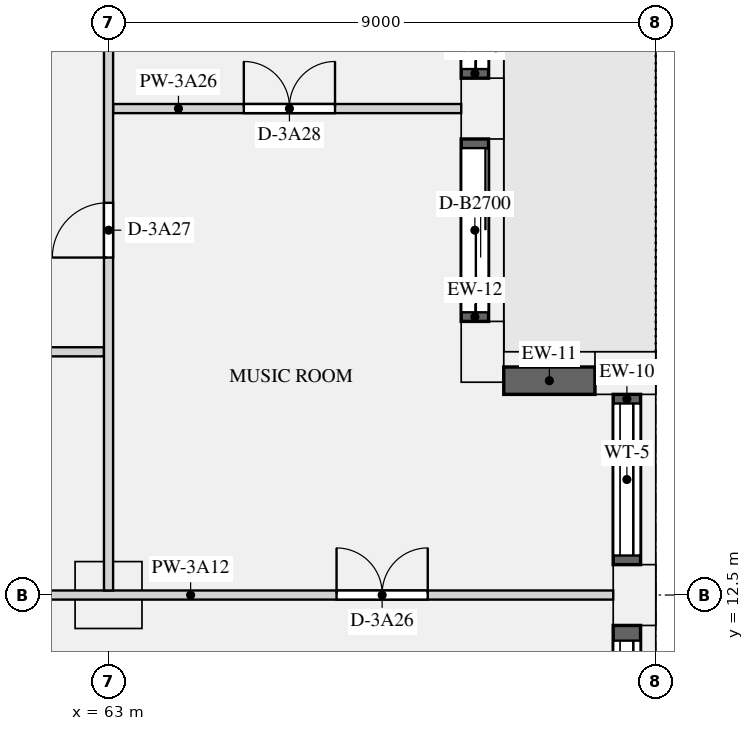
"""IFC4 building model, lengths in metres.
Left out: names, types, materials, properties, quantities, classifications, styles, units other than length and angle.
Written with IfcOpenShell. Run it as: python <this file> out.ifc"""

import sys

from ifc_helpers import new_model, si_unit, direction, frame, frame_2d, origin, origin_2d, place, context, subcontext, project, spatial, rectangle, extrude, element, fill, save


model = new_model("IFC4")
c1 = context("Model", 3, precision=1e-05, world=origin(), true_north=direction((0.0, 1.0)))
c2 = subcontext(c1, "Body", "Model", "MODEL_VIEW")
j1 = project(units=[si_unit("LENGTHUNIT", "METRE"), si_unit("PLANEANGLEUNIT", "RADIAN")], contexts=[c1])
p1 = place(None, origin())
s1 = spatial("IfcSite", under=j1, at=p1, CompositionType="ELEMENT")
p2 = place(p1, origin())
s2 = spatial("IfcBuilding", under=s1, at=p2, CompositionType="ELEMENT")
p3 = place(p2, frame((0.0, 0.0, 144.45)))
s3 = spatial("IfcBuildingStorey", under=s2, at=p3, CompositionType="ELEMENT", Elevation=144.45)
for number, where, z_axis, x_axis in (
    (1, (71.65, 12.5, 0.0), (0.0, 0.0, 1.0), (0.0, 1.0, 0.0)),
    (2, (71.5, 16.15, 0.0), (0.0, 0.0, 1.0), (-1.0, 0.0, 0.0)),
    (3, (69.15, 16.5, 0.0), (0.0, 0.0, 1.0), (0.0, 1.0, 0.0)),
    (4, (69.15, 20.5, 0.0), (0.0, 0.0, 1.0), (0.0, 1.0, 0.0)),
):
    element("IfcColumn", number, at=place(p3, frame(where, z_axis=z_axis, x_axis=x_axis)), inside=s3, PredefinedType="USERDEFINED", context=c2, shape_type="SweptSolid", body=[
        extrude(rectangle(XDim=1.0, YDim=0.7, at=origin_2d()), origin(), (0.0, 0.0, 1.0), 3.15),
    ])
p4 = place(p3, frame((63.0, 12.5, 0.0), z_axis=(0.0, 0.0, 1.0), x_axis=(1.0, 0.0, 0.0)))
e5 = element("IfcColumn", 5, at=p4, inside=s3, PredefinedType="COLUMN", context=c2, shape_type="SweptSolid", body=[
    extrude(rectangle(XDim=1.1, YDim=1.1, at=origin_2d()), origin(), (0.0, 0.0, 1.0), 3.15),
])
p5 = place(p3, frame((71.525, 9.0, 0.9), z_axis=(0.0, 0.0, 1.0), x_axis=(0.0, 1.0, 0.0)))
e6 = element("IfcWall", 6, at=p5, inside=s3, PredefinedType="SOLIDWALL", context=c2, shape_type="SweptSolid", body=[
    extrude(rectangle(XDim=3.0, YDim=0.45, at=frame_2d((1.5, 0.0))), origin(), (0.0, 0.0, 1.0), 1.93),
])
p6 = place(p5, frame((0.25, 0.0, 0.15)))
e7 = element("IfcOpeningElement", 7, at=p6, cuts=e6, PredefinedType="OPENING", context=c2, shape_type="SweptSolid", body=[
    extrude(rectangle(XDim=2.5, YDim=1.5, at=frame_2d((1.25, 0.75))), frame((0.0, 0.235, 0.0), z_axis=(0.0, -1.0, 0.0), x_axis=(1.0, 0.0, 0.0)), (0.0, 0.0, 1.0), 0.47),
])
p7 = place(p3, frame((71.525, 13.0, 0.9), z_axis=(0.0, 0.0, 1.0), x_axis=(0.0, 1.0, 0.0)))
e8 = element("IfcWall", 8, at=p7, inside=s3, PredefinedType="SOLIDWALL", context=c2, shape_type="SweptSolid", body=[
    extrude(rectangle(XDim=2.8, YDim=0.45, at=frame_2d((1.4, 0.0))), origin(), (0.0, 0.0, 1.0), 1.93),
])
p8 = place(p7, frame((0.15, 0.0, 0.15)))
e9 = element("IfcOpeningElement", 9, at=p8, cuts=e8, PredefinedType="OPENING", context=c2, shape_type="SweptSolid", body=[
    extrude(rectangle(XDim=2.5, YDim=1.5, at=frame_2d((1.25, 0.75))), frame((0.0, 0.235, 0.0), z_axis=(0.0, -1.0, 0.0), x_axis=(1.0, 0.0, 0.0)), (0.0, 0.0, 1.0), 0.47),
])
p9 = place(p3, frame((71.0, 16.025, 0.9), z_axis=(0.0, 0.0, 1.0), x_axis=(-1.0, 0.0, 0.0)))
e10 = element("IfcWall", 10, at=p9, inside=s3, PredefinedType="SOLIDWALL", context=c2, shape_type="SweptSolid", body=[
    extrude(rectangle(XDim=1.5, YDim=0.45, at=frame_2d((0.75, 0.0))), origin(), (0.0, 0.0, 1.0), 1.93),
])
p10 = place(p3, frame((69.025, 17.0, 0.0), z_axis=(0.0, 0.0, 1.0), x_axis=(0.0, 1.0, 0.0)))
e11 = element("IfcWall", 11, at=p10, inside=s3, PredefinedType="SOLIDWALL", context=c2, shape_type="SweptSolid", body=[
    extrude(rectangle(XDim=3.0, YDim=0.45, at=frame_2d((1.5, 0.0))), origin(), (0.0, 0.0, 1.0), 2.83),
])
p11 = place(p10, frame((0.15, 0.0, 0.0)))
e12 = element("IfcOpeningElement", 12, at=p11, cuts=e11, PredefinedType="OPENING", context=c2, shape_type="SweptSolid", body=[
    extrude(rectangle(XDim=2.7, YDim=2.3, at=frame_2d((1.35, 1.15))), frame((0.0, 0.235, 0.0), z_axis=(0.0, -1.0, 0.0), x_axis=(1.0, 0.0, 0.0)), (0.0, 0.0, 1.0), 0.47),
])
p12 = place(p3, frame((69.025, 21.0, 0.0), z_axis=(0.0, 0.0, 1.0), x_axis=(0.0, 1.0, 0.0)))
e13 = element("IfcWall", 13, at=p12, inside=s3, PredefinedType="SOLIDWALL", context=c2, shape_type="SweptSolid", body=[
    extrude(rectangle(XDim=3.0, YDim=0.45, at=frame_2d((1.5, 0.0))), origin(), (0.0, 0.0, 1.0), 2.83),
])
p13 = place(p12, frame((0.15, 0.0, 0.0)))
e14 = element("IfcOpeningElement", 14, at=p13, cuts=e13, PredefinedType="OPENING", context=c2, shape_type="SweptSolid", body=[
    extrude(rectangle(XDim=2.7, YDim=2.3, at=frame_2d((1.35, 1.15))), frame((0.0, 0.235, 0.0), z_axis=(0.0, -1.0, 0.0), x_axis=(1.0, 0.0, 0.0)), (0.0, 0.0, 1.0), 0.47),
])
p14 = place(p3, frame((54.0, 12.5, 0.0), z_axis=(0.0, 0.0, 1.0), x_axis=(1.0, 0.0, 0.0)))
e15 = element("IfcWall", 15, at=p14, inside=s3, PredefinedType="PARTITIONING", context=c2, shape_type="SweptSolid", body=[
    extrude(rectangle(XDim=17.3, YDim=0.15, at=frame_2d((8.65, 0.0))), origin(), (0.0, 0.0, 1.0), 2.83),
])
p15 = place(p14, frame((1.5, 0.0, 0.0)))
e16 = element("IfcOpeningElement", 16, at=p15, cuts=e15, PredefinedType="OPENING", context=c2, shape_type="SweptSolid", body=[
    extrude(rectangle(XDim=1.5, YDim=2.1, at=frame_2d((0.75, 1.05))), frame((0.0, 0.085, 0.0), z_axis=(0.0, -1.0, 0.0), x_axis=(1.0, 0.0, 0.0)), (0.0, 0.0, 1.0), 0.17),
])
p16 = place(p14, frame((7.05, 0.0, 0.0)))
e17 = element("IfcOpeningElement", 17, at=p16, cuts=e15, PredefinedType="OPENING", context=c2, shape_type="SweptSolid", body=[
    extrude(rectangle(XDim=0.9, YDim=2.1, at=frame_2d((0.45, 1.05))), frame((0.0, 0.085, 0.0), z_axis=(0.0, -1.0, 0.0), x_axis=(1.0, 0.0, 0.0)), (0.0, 0.0, 1.0), 0.17),
])
p17 = place(p14, frame((12.75, 0.0, 0.0)))
e18 = element("IfcOpeningElement", 18, at=p17, cuts=e15, PredefinedType="OPENING", context=c2, shape_type="SweptSolid", body=[
    extrude(rectangle(XDim=1.5, YDim=2.1, at=frame_2d((0.75, 1.05))), frame((0.0, 0.085, 0.0), z_axis=(0.0, -1.0, 0.0), x_axis=(1.0, 0.0, 0.0)), (0.0, 0.0, 1.0), 0.17),
])
p18 = place(p3, frame((58.575, 16.5, 0.0), z_axis=(0.0, 0.0, 1.0), x_axis=(1.0, 0.0, 0.0)))
e19 = element("IfcWall", 19, at=p18, inside=s3, PredefinedType="PARTITIONING", context=c2, shape_type="SweptSolid", body=[
    extrude(rectangle(XDim=4.35, YDim=0.15, at=frame_2d((2.175, 0.0))), origin(), (0.0, 0.0, 1.0), 2.83),
])
p19 = place(p3, frame((63.075, 20.5, 0.0), z_axis=(0.0, 0.0, 1.0), x_axis=(1.0, 0.0, 0.0)))
e20 = element("IfcWall", 20, at=p19, inside=s3, PredefinedType="PARTITIONING", context=c2, shape_type="SweptSolid", body=[
    extrude(rectangle(XDim=5.725, YDim=0.15, at=frame_2d((2.863, 0.0))), origin(), (0.0, 0.0, 1.0), 2.83),
])
p20 = place(p19, frame((2.15, 0.0, 0.0)))
e21 = element("IfcOpeningElement", 21, at=p20, cuts=e20, PredefinedType="OPENING", context=c2, shape_type="SweptSolid", body=[
    extrude(rectangle(XDim=1.5, YDim=2.1, at=frame_2d((0.75, 1.05))), frame((0.0, 0.085, 0.0), z_axis=(0.0, -1.0, 0.0), x_axis=(1.0, 0.0, 0.0)), (0.0, 0.0, 1.0), 0.17),
])
p21 = place(p3, frame((63.0, 12.575, 0.0), z_axis=(0.0, 0.0, 1.0), x_axis=(0.0, 1.0, 0.0)))
e22 = element("IfcWall", 22, at=p21, inside=s3, PredefinedType="PARTITIONING", context=c2, shape_type="SweptSolid", body=[
    extrude(rectangle(XDim=15.85, YDim=0.15, at=frame_2d((7.925, 0.0))), origin(), (0.0, 0.0, 1.0), 2.83),
])
p22 = place(p21, frame((5.475, 0.0, 0.0)))
e23 = element("IfcOpeningElement", 23, at=p22, cuts=e22, PredefinedType="OPENING", context=c2, shape_type="SweptSolid", body=[
    extrude(rectangle(XDim=0.9, YDim=2.1, at=frame_2d((0.45, 1.05))), frame((0.0, 0.085, 0.0), z_axis=(0.0, -1.0, 0.0), x_axis=(1.0, 0.0, 0.0)), (0.0, 0.0, 1.0), 0.17),
])
p23 = place(p6, origin())
e24 = element("IfcWindow", 24, at=p23, inside=s3, PartitioningType="SINGLE_PANEL", PredefinedType="WINDOW", context=c2, shape_type="SweptSolid", body=[
    extrude(rectangle(XDim=2.5, YDim=1.5, at=frame_2d((1.25, 0.75))), frame((0.0, -0.065, 0.0), z_axis=(0.0, -1.0, 0.0), x_axis=(1.0, 0.0, 0.0)), (0.0, 0.0, 1.0), 0.06),
])
fill(e7, e24)
p24 = place(p8, origin())
e25 = element("IfcWindow", 25, at=p24, inside=s3, PartitioningType="SINGLE_PANEL", PredefinedType="WINDOW", context=c2, shape_type="SweptSolid", body=[
    extrude(rectangle(XDim=2.5, YDim=1.5, at=frame_2d((1.25, 0.75))), frame((0.0, -0.065, 0.0), z_axis=(0.0, -1.0, 0.0), x_axis=(1.0, 0.0, 0.0)), (0.0, 0.0, 1.0), 0.06),
])
fill(e9, e25)
p25 = place(p11, origin())
e26 = element("IfcDoor", 26, at=p25, inside=s3, OperationType="SLIDING_TO_LEFT", PredefinedType="DOOR", context=c2, shape_type="SweptSolid", body=[
    extrude(rectangle(XDim=2.7, YDim=2.3, at=frame_2d((1.35, 1.15))), frame((0.0, -0.07, 0.0), z_axis=(0.0, -1.0, 0.0), x_axis=(1.0, 0.0, 0.0)), (0.0, 0.0, 1.0), 0.05),
])
fill(e12, e26)
p26 = place(p13, origin())
e27 = element("IfcDoor", 27, at=p26, inside=s3, OperationType="SLIDING_TO_LEFT", PredefinedType="DOOR", context=c2, shape_type="SweptSolid", body=[
    extrude(rectangle(XDim=2.7, YDim=2.3, at=frame_2d((1.35, 1.15))), frame((0.0, -0.07, 0.0), z_axis=(0.0, -1.0, 0.0), x_axis=(1.0, 0.0, 0.0)), (0.0, 0.0, 1.0), 0.05),
])
fill(e14, e27)
p27 = place(p17, origin())
e28 = element("IfcDoor", 28, at=p27, inside=s3, OperationType="DOUBLE_DOOR_SINGLE_SWING", PredefinedType="DOOR", context=c2, shape_type="SweptSolid", body=[
    extrude(rectangle(XDim=1.5, YDim=2.1, at=frame_2d((0.75, 1.05))), frame((0.0, 0.025, 0.0), z_axis=(0.0, -1.0, 0.0), x_axis=(1.0, 0.0, 0.0)), (0.0, 0.0, 1.0), 0.05),
])
fill(e18, e28)
p28 = place(p22, origin())
e29 = element("IfcDoor", 29, at=p28, inside=s3, OperationType="SINGLE_SWING_LEFT", PredefinedType="DOOR", context=c2, shape_type="SweptSolid", body=[
    extrude(rectangle(XDim=0.9, YDim=2.1, at=frame_2d((0.45, 1.05))), frame((0.0, 0.025, 0.0), z_axis=(0.0, -1.0, 0.0), x_axis=(1.0, 0.0, 0.0)), (0.0, 0.0, 1.0), 0.05),
])
fill(e23, e29)
p29 = place(p20, origin())
e30 = element("IfcDoor", 30, at=p29, inside=s3, OperationType="DOUBLE_DOOR_SINGLE_SWING", PredefinedType="DOOR", context=c2, shape_type="SweptSolid", body=[
    extrude(rectangle(XDim=1.5, YDim=2.1, at=frame_2d((0.75, 1.05))), frame((0.0, 0.025, 0.0), z_axis=(0.0, -1.0, 0.0), x_axis=(1.0, 0.0, 0.0)), (0.0, 0.0, 1.0), 0.05),
])
fill(e21, e30)
save(model, sys.argv[1])
